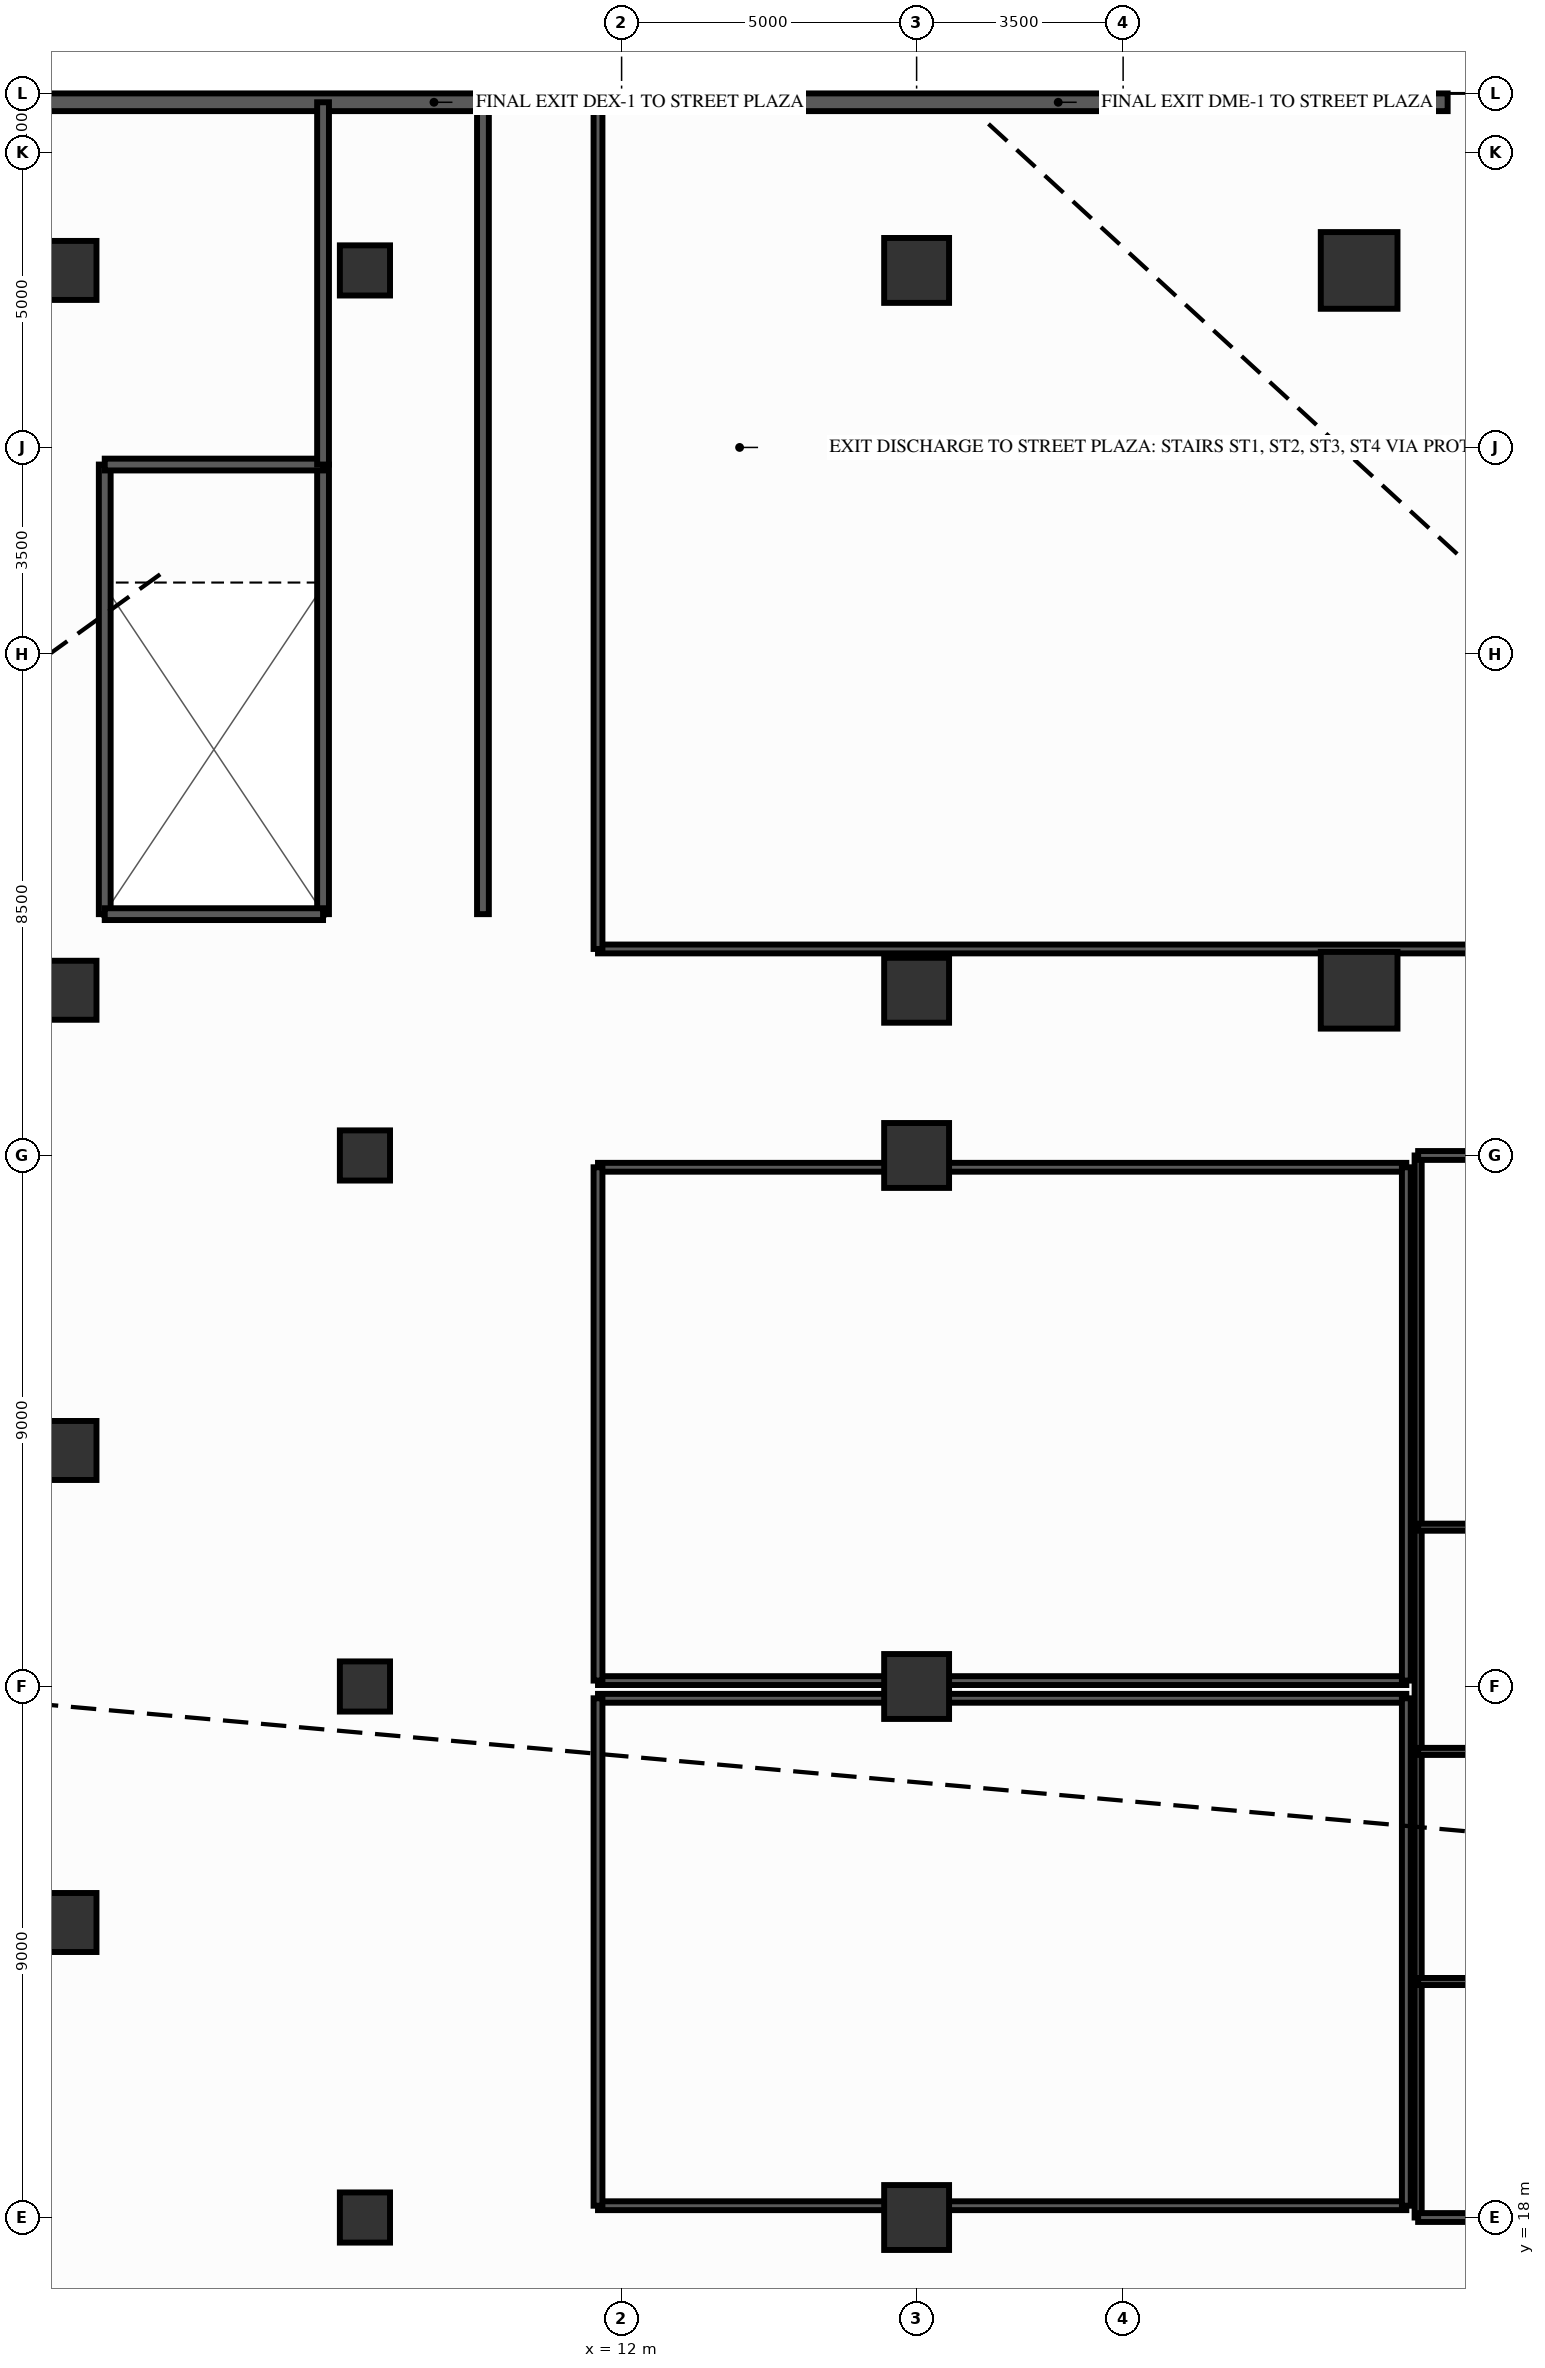
"""IFC4 building model, lengths in metres.
Left out: names, types, materials, properties, quantities, classifications, styles, units other than length and angle.
Written with IfcOpenShell. Run it as: python <this file> out.ifc"""

import sys

from ifc_helpers import new_model, si_unit, direction, frame, frame_2d, origin, origin_2d, place, context, subcontext, project, spatial, rectangle, circle, extrude, source, transform, mapped, element, fill, save


model = new_model("IFC4")
c1 = context("Model", 3, precision=1e-05, world=origin(), true_north=direction((0.0, 1.0)))
c2 = subcontext(c1, "Body", "Model", "MODEL_VIEW")
j1 = project(units=[si_unit("LENGTHUNIT", "METRE"), si_unit("PLANEANGLEUNIT", "RADIAN")], contexts=[c1])
p1 = place(None, origin())
s1 = spatial("IfcSite", under=j1, at=p1, CompositionType="ELEMENT")
p2 = place(p1, origin())
s2 = spatial("IfcBuilding", under=s1, at=p2, CompositionType="ELEMENT")
p3 = place(p2, origin())
s3 = spatial("IfcBuildingStorey", under=s2, at=p3, CompositionType="ELEMENT", Elevation=0.0)
m1 = source(origin(), c2, "Body", "SweptSolid", [
    extrude(circle(Radius=0.5, at=origin_2d()), origin(), (0.0, 0.0, 1.0), 4.2),
])
for number, where, z_axis, x_axis in (
    (1, (2.6, 23.0, 0.0), (0.0, 0.0, 1.0), (1.0, 0.0, 0.0)),
    (2, (2.6, 31.0, 0.0), (0.0, 0.0, 1.0), (1.0, 0.0, 0.0)),
    (3, (2.6, 38.8, 0.0), (0.0, 0.0, 1.0), (1.0, 0.0, 0.0)),
    (4, (2.6, 51.0, 0.0), (0.0, 0.0, 1.0), (1.0, 0.0, 0.0)),
):
    element("IfcColumn", number, at=place(p3, frame(where, z_axis=z_axis, x_axis=x_axis)), inside=s3, PredefinedType="COLUMN", context=c2, shape_type="MappedRepresentation", body=[
        mapped(m1, transform((0.0, 0.0, 0.0), scale=1.0)),
    ])
m2 = source(origin(), c2, "Body", "SweptSolid", [
    extrude(circle(Radius=0.425, at=origin_2d()), origin(), (0.0, 0.0, 1.0), 4.2),
])
for number, where, z_axis, x_axis in (
    (5, (7.65, 18.0, 0.0), (0.0, 0.0, 1.0), (1.0, 0.0, 0.0)),
    (6, (7.65, 27.0, 0.0), (0.0, 0.0, 1.0), (1.0, 0.0, 0.0)),
    (7, (7.65, 36.0, 0.0), (0.0, 0.0, 1.0), (1.0, 0.0, 0.0)),
    (8, (7.65, 51.0, 0.0), (0.0, 0.0, 1.0), (1.0, 0.0, 0.0)),
):
    element("IfcColumn", number, at=place(p3, frame(where, z_axis=z_axis, x_axis=x_axis)), inside=s3, PredefinedType="COLUMN", context=c2, shape_type="MappedRepresentation", body=[
        mapped(m2, transform((0.0, 0.0, 0.0), scale=1.0)),
    ])
m3 = source(origin(), c2, "Body", "SweptSolid", [
    extrude(rectangle(XDim=1.1, YDim=1.1, at=origin_2d()), origin(), (0.0, 0.0, 1.0), 4.2),
])
for number, where, z_axis, x_axis in (
    (9, (17.0, 18.0, 0.0), (0.0, 0.0, 1.0), (1.0, 0.0, 0.0)),
    (10, (17.0, 27.0, 0.0), (0.0, 0.0, 1.0), (1.0, 0.0, 0.0)),
    (11, (17.0, 36.0, 0.0), (0.0, 0.0, 1.0), (1.0, 0.0, 0.0)),
    (12, (17.0, 38.8, 0.0), (0.0, 0.0, 1.0), (1.0, 0.0, 0.0)),
    (13, (17.0, 51.0, 0.0), (0.0, 0.0, 1.0), (1.0, 0.0, 0.0)),
):
    element("IfcColumn", number, at=place(p3, frame(where, z_axis=z_axis, x_axis=x_axis)), inside=s3, PredefinedType="COLUMN", context=c2, shape_type="MappedRepresentation", body=[
        mapped(m3, transform((0.0, 0.0, 0.0), scale=1.0)),
    ])
m4 = source(origin(), c2, "Body", "SweptSolid", [
    extrude(rectangle(XDim=1.3, YDim=1.3, at=origin_2d()), origin(), (0.0, 0.0, 1.0), 4.2),
])
for number, where, z_axis, x_axis in (
    (14, (24.5, 38.8, 0.0), (0.0, 0.0, 1.0), (1.0, 0.0, 0.0)),
    (15, (24.5, 51.0, 0.0), (0.0, 0.0, 1.0), (1.0, 0.0, 0.0)),
):
    element("IfcColumn", number, at=place(p3, frame(where, z_axis=z_axis, x_axis=x_axis)), inside=s3, PredefinedType="COLUMN", context=c2, shape_type="MappedRepresentation", body=[
        mapped(m4, transform((0.0, 0.0, 0.0), scale=1.0)),
    ])
p4 = place(p3, frame((0.0, 53.85, 0.0), z_axis=(0.0, 0.0, 1.0), x_axis=(1.0, 0.0, 0.0)))
e16 = element("IfcWall", 16, at=p4, inside=s3, PredefinedType="SOLIDWALL", context=c2, shape_type="SweptSolid", body=[
    extrude(rectangle(XDim=26.0, YDim=0.3, at=frame_2d((13.0, 0.0))), origin(), (0.0, 0.0, 1.0), 3.48),
])
p5 = place(p4, frame((18.2, 0.0, 0.0)))
e17 = element("IfcOpeningElement", 17, at=p5, cuts=e16, PredefinedType="OPENING", context=c2, shape_type="SweptSolid", body=[
    extrude(rectangle(XDim=2.4, YDim=2.4, at=frame_2d((1.2, 1.2))), frame((0.0, 0.162, 0.0), z_axis=(0.0, -1.0, 0.0), x_axis=(1.0, 0.0, 0.0)), (0.0, 0.0, 1.0), 0.324),
])
p6 = place(p4, frame((8.12, 0.0, 0.0)))
e18 = element("IfcOpeningElement", 18, at=p6, cuts=e16, PredefinedType="OPENING", context=c2, shape_type="SweptSolid", body=[
    extrude(rectangle(XDim=1.4, YDim=2.2, at=frame_2d((0.7, 1.1))), frame((0.0, 0.162, 0.0), z_axis=(0.0, -1.0, 0.0), x_axis=(1.0, 0.0, 0.0)), (0.0, 0.0, 1.0), 0.324),
])
p7 = place(p3, frame((3.24, 40.09, 0.0), z_axis=(0.0, 0.0, 1.0), x_axis=(0.0, 1.0, 0.0)))
e19 = element("IfcWall", 19, at=p7, inside=s3, PredefinedType="SOLIDWALL", context=c2, shape_type="SweptSolid", body=[
    extrude(rectangle(XDim=7.62, YDim=0.2, at=frame_2d((3.81, 0.0))), origin(), (0.0, 0.0, 1.0), 3.92),
])
p8 = place(p3, frame((6.94, 40.09, 0.0), z_axis=(0.0, 0.0, 1.0), x_axis=(0.0, 1.0, 0.0)))
e20 = element("IfcWall", 20, at=p8, inside=s3, PredefinedType="SOLIDWALL", context=c2, shape_type="SweptSolid", body=[
    extrude(rectangle(XDim=7.62, YDim=0.2, at=frame_2d((3.81, 0.0))), origin(), (0.0, 0.0, 1.0), 3.92),
])
p9 = place(p8, frame((7.15, 0.0, 0.0), z_axis=(0.0, 0.0, 1.0), x_axis=(-1.0, 0.0, 0.0)))
e21 = element("IfcOpeningElement", 21, at=p9, cuts=e20, PredefinedType="OPENING", context=c2, shape_type="SweptSolid", body=[
    extrude(rectangle(XDim=1.1, YDim=2.15, at=frame_2d((0.55, 1.075))), frame((0.0, 0.112, 0.0), z_axis=(0.0, -1.0, 0.0), x_axis=(1.0, 0.0, 0.0)), (0.0, 0.0, 1.0), 0.224),
])
for number, where, z_axis, x_axis in (
    (22, (3.24, 40.09, 0.0), (0.0, 0.0, 1.0), (1.0, 0.0, 0.0)),
    (23, (3.24, 47.71, 0.0), (0.0, 0.0, 1.0), (1.0, 0.0, 0.0)),
):
    element("IfcWall", number, at=place(p3, frame(where, z_axis=z_axis, x_axis=x_axis)), inside=s3, PredefinedType="SOLIDWALL", context=c2, shape_type="SweptSolid", body=[
        extrude(rectangle(XDim=3.7, YDim=0.2, at=frame_2d((1.85, 0.0))), origin(), (0.0, 0.0, 1.0), 3.92),
    ])
p10 = place(p3, frame((6.94, 47.71, 0.0), z_axis=(0.0, 0.0, 1.0), x_axis=(0.0, 1.0, 0.0)))
e24 = element("IfcWall", 24, at=p10, inside=s3, PredefinedType="PARTITIONING", context=c2, shape_type="SweptSolid", body=[
    extrude(rectangle(XDim=6.14, YDim=0.2, at=frame_2d((3.07, 0.0))), origin(), (0.0, 0.0, 1.0), 3.92),
])
p11 = place(p3, frame((9.65, 40.09, 0.0), z_axis=(0.0, 0.0, 1.0), x_axis=(0.0, 1.0, 0.0)))
e25 = element("IfcWall", 25, at=p11, inside=s3, PredefinedType="PARTITIONING", context=c2, shape_type="SweptSolid", body=[
    extrude(rectangle(XDim=13.76, YDim=0.2, at=frame_2d((6.88, 0.0))), origin(), (0.0, 0.0, 1.0), 3.92),
])
p12 = place(p11, frame((3.3, 0.0, 0.0), z_axis=(0.0, 0.0, 1.0), x_axis=(-1.0, 0.0, 0.0)))
e26 = element("IfcOpeningElement", 26, at=p12, cuts=e25, PredefinedType="OPENING", context=c2, shape_type="SweptSolid", body=[
    extrude(rectangle(XDim=1.1, YDim=2.15, at=frame_2d((0.55, 1.075))), frame((0.0, 0.112, 0.0), z_axis=(0.0, -1.0, 0.0), x_axis=(1.0, 0.0, 0.0)), (0.0, 0.0, 1.0), 0.224),
])
p13 = place(p3, frame((25.5, 18.0, 0.0), z_axis=(0.0, 0.0, 1.0), x_axis=(0.0, 1.0, 0.0)))
e27 = element("IfcWall", 27, at=p13, inside=s3, PredefinedType="PARTITIONING", context=c2, shape_type="SweptSolid", body=[
    extrude(rectangle(XDim=18.0, YDim=0.12, at=frame_2d((9.0, 0.0))), origin(), (0.0, 0.0, 1.0), 3.92),
])
for number, where, z_axis, x_axis in (
    (28, (25.5, 22.0, 0.0), (0.0, 0.0, 1.0), (1.0, 0.0, 0.0)),
    (29, (25.5, 25.9, 0.0), (0.0, 0.0, 1.0), (1.0, 0.0, 0.0)),
    (30, (25.5, 29.7, 0.0), (0.0, 0.0, 1.0), (1.0, 0.0, 0.0)),
):
    element("IfcWall", number, at=place(p3, frame(where, z_axis=z_axis, x_axis=x_axis)), inside=s3, PredefinedType="PARTITIONING", context=c2, shape_type="SweptSolid", body=[
        extrude(rectangle(XDim=3.5, YDim=0.12, at=frame_2d((1.75, 0.0))), origin(), (0.0, 0.0, 1.0), 3.92),
    ])
for number, where, z_axis, x_axis in (
    (31, (25.5, 36.0, 0.0), (0.0, 0.0, 1.0), (1.0, 0.0, 0.0)),
    (32, (25.5, 18.0, 0.0), (0.0, 0.0, 1.0), (1.0, 0.0, 0.0)),
):
    element("IfcWall", number, at=place(p3, frame(where, z_axis=z_axis, x_axis=x_axis)), inside=s3, PredefinedType="PARTITIONING", context=c2, shape_type="SweptSolid", body=[
        extrude(rectangle(XDim=3.5, YDim=0.15, at=frame_2d((1.75, 0.0))), origin(), (0.0, 0.0, 1.0), 3.29),
    ])
p14 = place(p3, frame((11.6, 39.5, 0.0), z_axis=(0.0, 0.0, 1.0), x_axis=(1.0, 0.0, 0.0)))
e33 = element("IfcWall", 33, at=p14, inside=s3, PredefinedType="PARTITIONING", context=c2, shape_type="SweptSolid", body=[
    extrude(rectangle(XDim=23.4, YDim=0.15, at=frame_2d((11.7, 0.0))), origin(), (0.0, 0.0, 1.0), 3.92),
])
p15 = place(p14, frame((9.844, 0.0, 0.0)))
e34 = element("IfcOpeningElement", 34, at=p15, cuts=e33, PredefinedType="OPENING", context=c2, shape_type="SweptSolid", body=[
    extrude(rectangle(XDim=1.0, YDim=2.15, at=frame_2d((0.5, 1.075))), frame((0.0, 0.087, 0.0), z_axis=(0.0, -1.0, 0.0), x_axis=(1.0, 0.0, 0.0)), (0.0, 0.0, 1.0), 0.174),
])
p16 = place(p3, frame((11.6, 39.5, 0.0), z_axis=(0.0, 0.0, 1.0), x_axis=(0.0, 1.0, 0.0)))
e35 = element("IfcWall", 35, at=p16, inside=s3, PredefinedType="PARTITIONING", context=c2, shape_type="SweptSolid", body=[
    extrude(rectangle(XDim=14.4, YDim=0.15, at=frame_2d((7.2, 0.0))), origin(), (0.0, 0.0, 1.0), 3.92),
])
for number, where, z_axis, x_axis in (
    (36, (11.6, 18.2, 0.0), (0.0, 0.0, 1.0), (1.0, 0.0, 0.0)),
    (37, (11.6, 26.8, 0.0), (0.0, 0.0, 1.0), (1.0, 0.0, 0.0)),
):
    element("IfcWall", number, at=place(p3, frame(where, z_axis=z_axis, x_axis=x_axis)), inside=s3, PredefinedType="PARTITIONING", context=c2, shape_type="SweptSolid", body=[
        extrude(rectangle(XDim=13.7, YDim=0.15, at=frame_2d((6.85, 0.0))), origin(), (0.0, 0.0, 1.0), 3.92),
    ])
p17 = place(p3, frame((11.6, 18.2, 0.0), z_axis=(0.0, 0.0, 1.0), x_axis=(0.0, 1.0, 0.0)))
e38 = element("IfcWall", 38, at=p17, inside=s3, PredefinedType="PARTITIONING", context=c2, shape_type="SweptSolid", body=[
    extrude(rectangle(XDim=8.6, YDim=0.15, at=frame_2d((4.3, 0.0))), origin(), (0.0, 0.0, 1.0), 3.92),
])
p18 = place(p17, frame((3.584, 0.0, 0.0)))
e39 = element("IfcOpeningElement", 39, at=p18, cuts=e38, PredefinedType="OPENING", context=c2, shape_type="SweptSolid", body=[
    extrude(rectangle(XDim=1.0, YDim=2.1, at=frame_2d((0.5, 1.05))), frame((0.0, 0.087, 0.0), z_axis=(0.0, -1.0, 0.0), x_axis=(1.0, 0.0, 0.0)), (0.0, 0.0, 1.0), 0.174),
])
p19 = place(p3, frame((25.3, 18.2, 0.0), z_axis=(0.0, 0.0, 1.0), x_axis=(0.0, 1.0, 0.0)))
e40 = element("IfcWall", 40, at=p19, inside=s3, PredefinedType="PARTITIONING", context=c2, shape_type="SweptSolid", body=[
    extrude(rectangle(XDim=8.6, YDim=0.15, at=frame_2d((4.3, 0.0))), origin(), (0.0, 0.0, 1.0), 3.92),
])
for number, where, z_axis, x_axis in (
    (41, (11.6, 27.1, 0.0), (0.0, 0.0, 1.0), (1.0, 0.0, 0.0)),
    (42, (11.6, 35.8, 0.0), (0.0, 0.0, 1.0), (1.0, 0.0, 0.0)),
):
    element("IfcWall", number, at=place(p3, frame(where, z_axis=z_axis, x_axis=x_axis)), inside=s3, PredefinedType="PARTITIONING", context=c2, shape_type="SweptSolid", body=[
        extrude(rectangle(XDim=13.7, YDim=0.15, at=frame_2d((6.85, 0.0))), origin(), (0.0, 0.0, 1.0), 3.92),
    ])
p20 = place(p3, frame((11.6, 27.1, 0.0), z_axis=(0.0, 0.0, 1.0), x_axis=(0.0, 1.0, 0.0)))
e43 = element("IfcWall", 43, at=p20, inside=s3, PredefinedType="PARTITIONING", context=c2, shape_type="SweptSolid", body=[
    extrude(rectangle(XDim=8.7, YDim=0.15, at=frame_2d((4.35, 0.0))), origin(), (0.0, 0.0, 1.0), 3.92),
])
p21 = place(p20, frame((3.631, 0.0, 0.0)))
e44 = element("IfcOpeningElement", 44, at=p21, cuts=e43, PredefinedType="OPENING", context=c2, shape_type="SweptSolid", body=[
    extrude(rectangle(XDim=1.0, YDim=2.1, at=frame_2d((0.5, 1.05))), frame((0.0, 0.087, 0.0), z_axis=(0.0, -1.0, 0.0), x_axis=(1.0, 0.0, 0.0)), (0.0, 0.0, 1.0), 0.174),
])
p22 = place(p3, frame((25.3, 27.1, 0.0), z_axis=(0.0, 0.0, 1.0), x_axis=(0.0, 1.0, 0.0)))
e45 = element("IfcWall", 45, at=p22, inside=s3, PredefinedType="PARTITIONING", context=c2, shape_type="SweptSolid", body=[
    extrude(rectangle(XDim=8.7, YDim=0.15, at=frame_2d((4.35, 0.0))), origin(), (0.0, 0.0, 1.0), 3.92),
])
m5 = source(origin(), c2, "Body", "SweptSolid", [
    extrude(rectangle(XDim=2.4, YDim=2.4, at=frame_2d((1.2, 1.2))), frame((0.0, 0.025, 0.0), z_axis=(0.0, -1.0, 0.0), x_axis=(1.0, 0.0, 0.0)), (0.0, 0.0, 1.0), 0.05),
])
p23 = place(p5, origin())
e46 = element("IfcDoor", 46, at=p23, inside=s3, OperationType="DOUBLE_SWING_LEFT", PredefinedType="DOOR", context=c2, shape_type="MappedRepresentation", body=[
    mapped(m5, transform((0.0, 0.0, 0.0), scale=1.0)),
])
fill(e17, e46)
m6 = source(origin(), c2, "Body", "SweptSolid", [
    extrude(rectangle(XDim=1.4, YDim=2.2, at=frame_2d((0.7, 1.1))), frame((0.0, 0.025, 0.0), z_axis=(0.0, -1.0, 0.0), x_axis=(1.0, 0.0, 0.0)), (0.0, 0.0, 1.0), 0.05),
])
p24 = place(p6, origin())
e47 = element("IfcDoor", 47, at=p24, inside=s3, OperationType="SINGLE_SWING_LEFT", PredefinedType="DOOR", context=c2, shape_type="MappedRepresentation", body=[
    mapped(m6, transform((0.0, 0.0, 0.0), scale=1.0)),
])
fill(e18, e47)
m7 = source(origin(), c2, "Body", "SweptSolid", [
    extrude(rectangle(XDim=1.1, YDim=2.15, at=frame_2d((0.55, 1.075))), frame((0.0, 0.025, 0.0), z_axis=(0.0, -1.0, 0.0), x_axis=(1.0, 0.0, 0.0)), (0.0, 0.0, 1.0), 0.05),
])
p25 = place(p9, origin())
e48 = element("IfcDoor", 48, at=p25, inside=s3, OperationType="SINGLE_SWING_RIGHT", PredefinedType="DOOR", context=c2, shape_type="MappedRepresentation", body=[
    mapped(m7, transform((0.0, 0.0, 0.0), scale=1.0)),
])
fill(e21, e48)
p26 = place(p12, origin())
e49 = element("IfcDoor", 49, at=p26, inside=s3, OperationType="SINGLE_SWING_LEFT", PredefinedType="DOOR", context=c2, shape_type="MappedRepresentation", body=[
    mapped(m7, transform((0.0, 0.0, 0.0), scale=1.0)),
])
fill(e26, e49)
m8 = source(origin(), c2, "Body", "SweptSolid", [
    extrude(rectangle(XDim=1.0, YDim=2.15, at=frame_2d((0.5, 1.075))), frame((0.0, 0.025, 0.0), z_axis=(0.0, -1.0, 0.0), x_axis=(1.0, 0.0, 0.0)), (0.0, 0.0, 1.0), 0.05),
])
p27 = place(p15, origin())
e50 = element("IfcDoor", 50, at=p27, inside=s3, OperationType="SINGLE_SWING_RIGHT", PredefinedType="DOOR", context=c2, shape_type="MappedRepresentation", body=[
    mapped(m8, transform((0.0, 0.0, 0.0), scale=1.0)),
])
fill(e34, e50)
m9 = source(origin(), c2, "Body", "SweptSolid", [
    extrude(rectangle(XDim=1.0, YDim=2.1, at=frame_2d((0.5, 1.05))), frame((0.0, 0.025, 0.0), z_axis=(0.0, -1.0, 0.0), x_axis=(1.0, 0.0, 0.0)), (0.0, 0.0, 1.0), 0.05),
])
p28 = place(p18, origin())
e51 = element("IfcDoor", 51, at=p28, inside=s3, OperationType="SINGLE_SWING_RIGHT", PredefinedType="DOOR", context=c2, shape_type="MappedRepresentation", body=[
    mapped(m9, transform((0.0, 0.0, 0.0), scale=1.0)),
])
fill(e39, e51)
p29 = place(p21, origin())
e52 = element("IfcDoor", 52, at=p29, inside=s3, OperationType="SINGLE_SWING_LEFT", PredefinedType="DOOR", context=c2, shape_type="MappedRepresentation", body=[
    mapped(m9, transform((0.0, 0.0, 0.0), scale=1.0)),
])
fill(e44, e52)
save(model, sys.argv[1])
